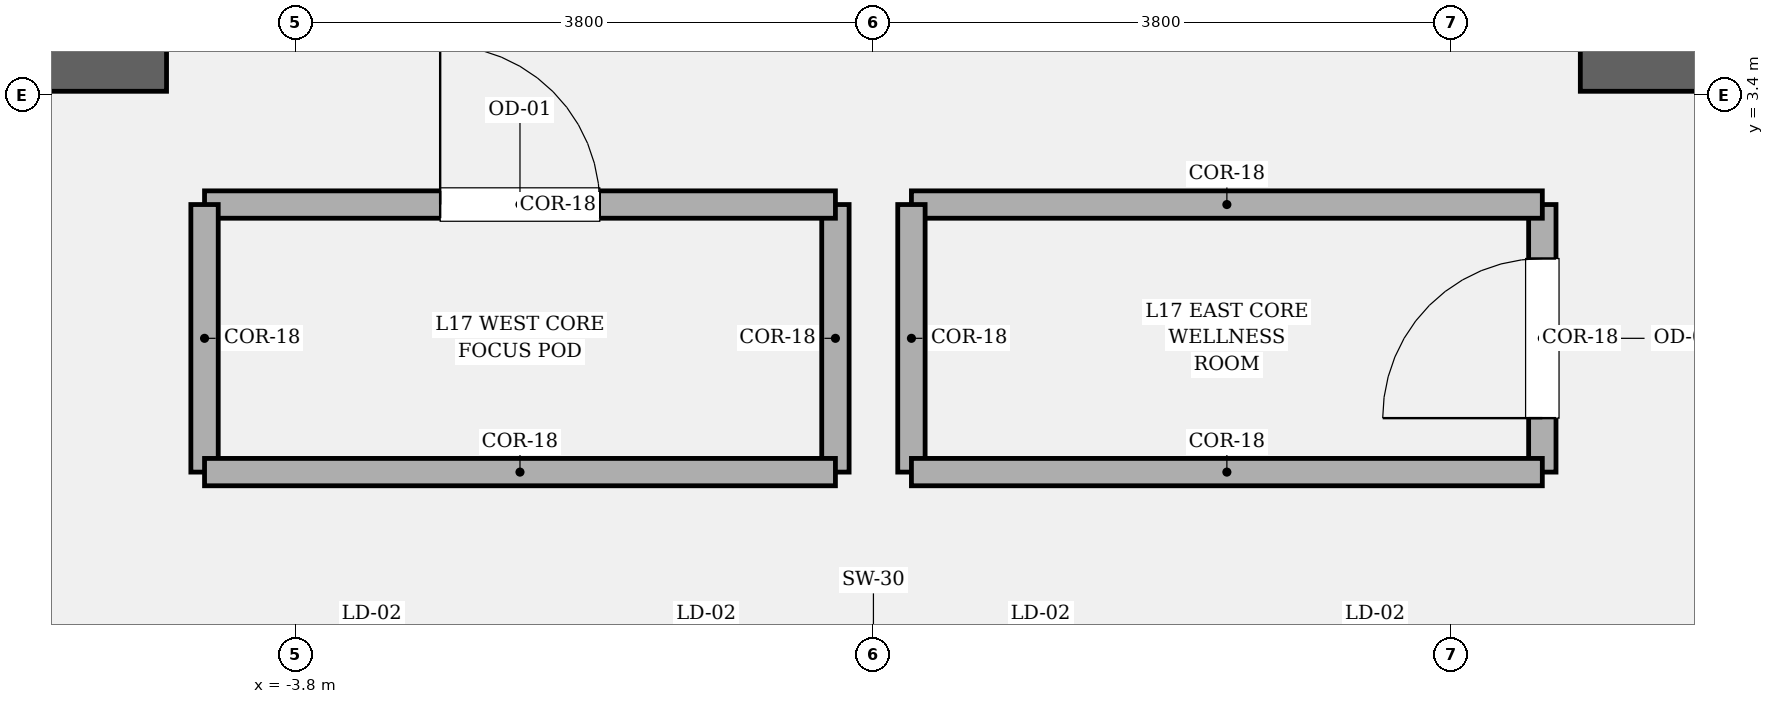
"""IFC4 building model, lengths in metres.
Left out: names, types, materials, properties, quantities, classifications, styles, units other than length and angle.
Written with IfcOpenShell. Run it as: python <this file> out.ifc"""

import sys

from ifc_helpers import new_model, si_unit, direction, frame, frame_2d, origin, place, context, subcontext, project, spatial, rectangle, extrude, element, fill, save


model = new_model("IFC4")
c1 = context("Model", 3, precision=1e-05, world=origin(), true_north=direction((0.0, 1.0)))
c2 = subcontext(c1, "Body", "Model", "MODEL_VIEW")
j1 = project(units=[si_unit("LENGTHUNIT", "METRE"), si_unit("PLANEANGLEUNIT", "RADIAN")], contexts=[c1])
p1 = place(None, origin())
s1 = spatial("IfcSite", under=j1, at=p1, CompositionType="ELEMENT")
p2 = place(p1, origin())
s2 = spatial("IfcBuilding", under=s1, at=p2, CompositionType="ELEMENT")
p3 = place(p2, frame((0.0, 0.0, 76.8)))
s3 = spatial("IfcBuildingStorey", under=s2, at=p3, CompositionType="ELEMENT", Elevation=76.8)
for number, where, z_axis, x_axis in (
    (1, (-9.825, 3.6, 0.0), (0.0, 0.0, 1.0), (1.0, 0.0, 0.0)),
    (2, (4.65, 3.6, 0.0), (0.0, 0.0, 1.0), (1.0, 0.0, 0.0)),
):
    element("IfcWall", number, at=place(p3, frame(where, z_axis=z_axis, x_axis=x_axis)), inside=s3, PredefinedType="SOLIDWALL", context=c2, shape_type="SweptSolid", body=[
        extrude(rectangle(XDim=5.175, YDim=0.35, at=frame_2d((2.587, 0.0))), origin(), (0.0, 0.0, 1.0), 4.05),
    ])
p4 = place(p3, frame((-0.25, 0.92, 0.0), z_axis=(0.0, 0.0, 1.0), x_axis=(0.0, 1.0, 0.0)))
e3 = element("IfcWall", 3, at=p4, inside=s3, PredefinedType="PARTITIONING", context=c2, shape_type="SweptSolid", body=[
    extrude(rectangle(XDim=1.76, YDim=0.18, at=frame_2d((0.88, 0.0))), origin(), (0.0, 0.0, 1.0), 3.81),
])
p5 = place(p3, frame((-0.25, 2.68, 0.0), z_axis=(0.0, 0.0, 1.0), x_axis=(-1.0, 0.0, 0.0)))
e4 = element("IfcWall", 4, at=p5, inside=s3, PredefinedType="PARTITIONING", context=c2, shape_type="SweptSolid", body=[
    extrude(rectangle(XDim=4.15, YDim=0.18, at=frame_2d((2.075, 0.0))), origin(), (0.0, 0.0, 1.0), 3.81),
])
p6 = place(p5, frame((1.55, 0.0, 0.0)))
e5 = element("IfcOpeningElement", 5, at=p6, cuts=e4, PredefinedType="OPENING", context=c2, shape_type="SweptSolid", body=[
    extrude(rectangle(XDim=1.05, YDim=2.2, at=frame_2d((0.525, 1.1))), frame((0.0, 0.1, 0.0), z_axis=(0.0, -1.0, 0.0), x_axis=(1.0, 0.0, 0.0)), (0.0, 0.0, 1.0), 0.2),
])
p7 = place(p3, frame((-4.4, 2.68, 0.0), z_axis=(0.0, 0.0, 1.0), x_axis=(0.0, -1.0, 0.0)))
e6 = element("IfcWall", 6, at=p7, inside=s3, PredefinedType="PARTITIONING", context=c2, shape_type="SweptSolid", body=[
    extrude(rectangle(XDim=1.76, YDim=0.18, at=frame_2d((0.88, 0.0))), origin(), (0.0, 0.0, 1.0), 3.81),
])
p8 = place(p3, frame((-4.4, 0.92, 0.0), z_axis=(0.0, 0.0, 1.0), x_axis=(1.0, 0.0, 0.0)))
e7 = element("IfcWall", 7, at=p8, inside=s3, PredefinedType="PARTITIONING", context=c2, shape_type="SweptSolid", body=[
    extrude(rectangle(XDim=4.15, YDim=0.18, at=frame_2d((2.075, 0.0))), origin(), (0.0, 0.0, 1.0), 3.81),
])
p9 = place(p3, frame((4.4, 0.92, 0.0), z_axis=(0.0, 0.0, 1.0), x_axis=(0.0, 1.0, 0.0)))
e8 = element("IfcWall", 8, at=p9, inside=s3, PredefinedType="PARTITIONING", context=c2, shape_type="SweptSolid", body=[
    extrude(rectangle(XDim=1.76, YDim=0.18, at=frame_2d((0.88, 0.0))), origin(), (0.0, 0.0, 1.0), 3.81),
])
p10 = place(p9, frame((0.355, 0.0, 0.0)))
e9 = element("IfcOpeningElement", 9, at=p10, cuts=e8, PredefinedType="OPENING", context=c2, shape_type="SweptSolid", body=[
    extrude(rectangle(XDim=1.05, YDim=2.2, at=frame_2d((0.525, 1.1))), frame((0.0, 0.1, 0.0), z_axis=(0.0, -1.0, 0.0), x_axis=(1.0, 0.0, 0.0)), (0.0, 0.0, 1.0), 0.2),
])
p11 = place(p3, frame((4.4, 2.68, 0.0), z_axis=(0.0, 0.0, 1.0), x_axis=(-1.0, 0.0, 0.0)))
e10 = element("IfcWall", 10, at=p11, inside=s3, PredefinedType="PARTITIONING", context=c2, shape_type="SweptSolid", body=[
    extrude(rectangle(XDim=4.15, YDim=0.18, at=frame_2d((2.075, 0.0))), origin(), (0.0, 0.0, 1.0), 3.81),
])
p12 = place(p3, frame((0.25, 2.68, 0.0), z_axis=(0.0, 0.0, 1.0), x_axis=(0.0, -1.0, 0.0)))
e11 = element("IfcWall", 11, at=p12, inside=s3, PredefinedType="PARTITIONING", context=c2, shape_type="SweptSolid", body=[
    extrude(rectangle(XDim=1.76, YDim=0.18, at=frame_2d((0.88, 0.0))), origin(), (0.0, 0.0, 1.0), 3.81),
])
p13 = place(p3, frame((0.25, 0.92, 0.0), z_axis=(0.0, 0.0, 1.0), x_axis=(1.0, 0.0, 0.0)))
e12 = element("IfcWall", 12, at=p13, inside=s3, PredefinedType="PARTITIONING", context=c2, shape_type="SweptSolid", body=[
    extrude(rectangle(XDim=4.15, YDim=0.18, at=frame_2d((2.075, 0.0))), origin(), (0.0, 0.0, 1.0), 3.81),
])
p14 = place(p6, origin())
e13 = element("IfcDoor", 13, at=p14, inside=s3, OperationType="SINGLE_SWING_RIGHT", PredefinedType="DOOR", context=c2, shape_type="SweptSolid", body=[
    extrude(rectangle(XDim=1.05, YDim=2.2, at=frame_2d((0.525, 1.1))), frame((0.0, 0.025, 0.0), z_axis=(0.0, -1.0, 0.0), x_axis=(1.0, 0.0, 0.0)), (0.0, 0.0, 1.0), 0.05),
])
fill(e5, e13)
p15 = place(p10, origin())
e14 = element("IfcDoor", 14, at=p15, inside=s3, OperationType="SINGLE_SWING_LEFT", PredefinedType="DOOR", context=c2, shape_type="SweptSolid", body=[
    extrude(rectangle(XDim=1.05, YDim=2.2, at=frame_2d((0.525, 1.1))), frame((0.0, 0.025, 0.0), z_axis=(0.0, -1.0, 0.0), x_axis=(1.0, 0.0, 0.0)), (0.0, 0.0, 1.0), 0.05),
])
fill(e9, e14)
save(model, sys.argv[1])
